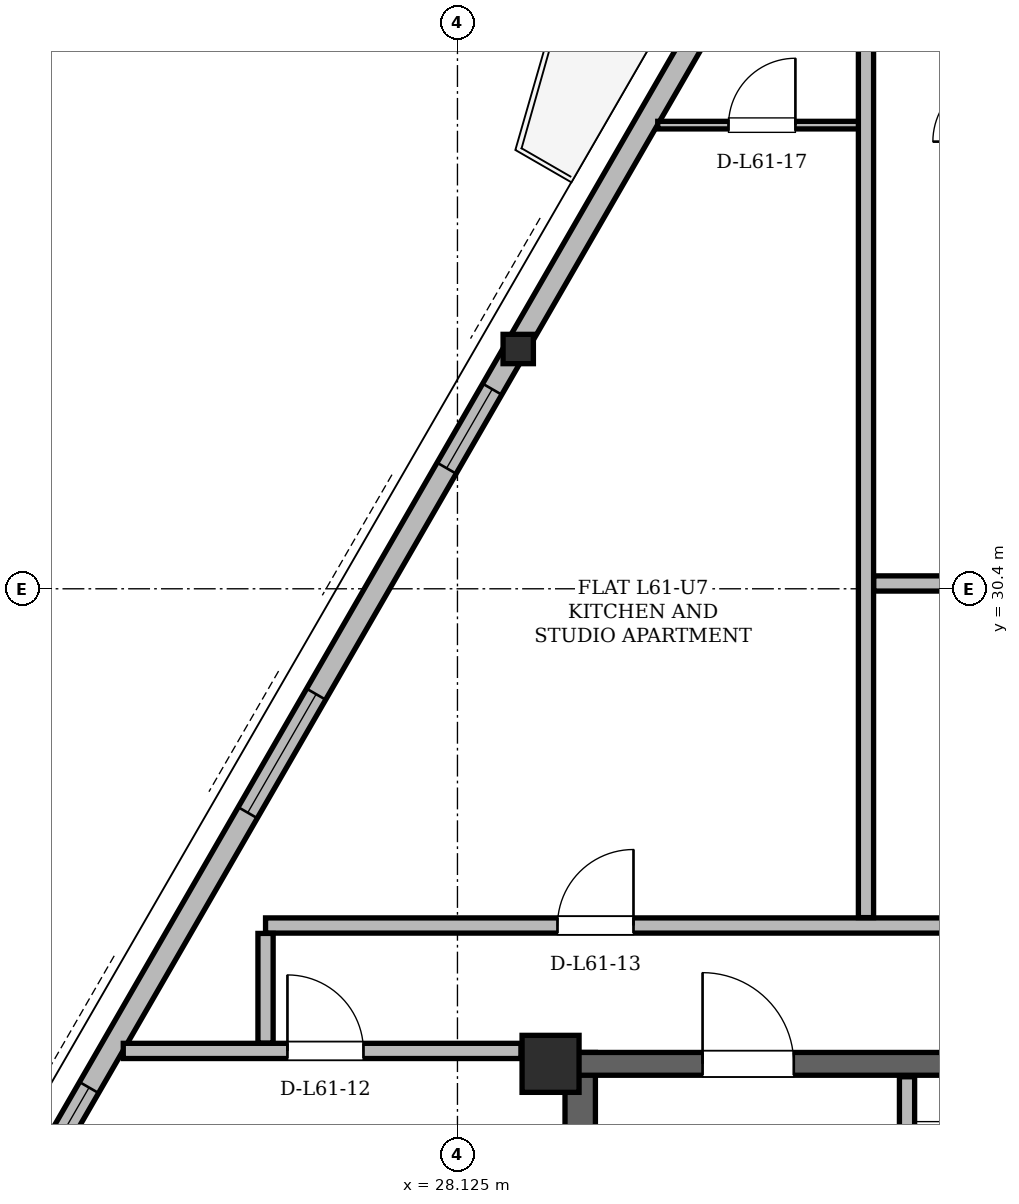
"""IFC4 building model, lengths in metres.
Left out: names, types, materials, properties, quantities, classifications, styles, units other than length and angle.
Written with IfcOpenShell. Run it as: python <this file> out.ifc"""

import sys

from ifc_helpers import new_model, si_unit, direction, frame, frame_2d, origin, origin_2d, place, context, subcontext, project, spatial, rectangle, hollow_rectangle, i_section, extrude, element, fill, save


model = new_model("IFC4")
c1 = context("Model", 3, precision=1e-05, world=origin(), true_north=direction((0.0, 1.0)))
c2 = subcontext(c1, "Body", "Model", "MODEL_VIEW")
j1 = project(units=[si_unit("LENGTHUNIT", "METRE"), si_unit("PLANEANGLEUNIT", "RADIAN")], contexts=[c1])
p1 = place(None, origin())
s1 = spatial("IfcSite", under=j1, at=p1, CompositionType="ELEMENT")
p2 = place(p1, origin())
s2 = spatial("IfcBuilding", under=s1, at=p2, CompositionType="ELEMENT")
p3 = place(p2, frame((0.0, 0.0, 230.7)))
s3 = spatial("IfcBuildingStorey", under=s2, at=p3, CompositionType="ELEMENT", Elevation=230.7)
p4 = place(p3, frame((29.35, 24.15, 0.0), z_axis=(0.0, 0.0, 1.0), x_axis=(1.0, 0.0, 0.0)))
e1 = element("IfcColumn", 1, at=p4, inside=s3, PredefinedType="COLUMN", context=c2, shape_type="SweptSolid", body=[
    extrude(hollow_rectangle(XDim=0.75, YDim=0.75, WallThickness=0.06, at=origin_2d()), origin(), (0.0, 0.0, 1.0), 3.6),
])
p5 = place(p3, frame((28.894, 33.566, 0.005), z_axis=(0.016926783589, -0.006458009803, 0.999835875585), x_axis=(0.356463384925, 0.934309293119, 0.0)))
e2 = element("IfcColumn", 2, at=p5, inside=s3, PredefinedType="COLUMN", context=c2, shape_type="SweptSolid", body=[
    extrude(i_section(OverallWidth=0.399, OverallDepth=0.386, WebThickness=0.021, FlangeThickness=0.033, at=origin_2d()), origin(), (0.0, 0.0, 1.0), 3.591),
])
p6 = place(p3, frame((29.74, 11.0, 0.0), z_axis=(0.0, 0.0, 1.0), x_axis=(0.0, 1.0, 0.0)))
e3 = element("IfcWall", 3, at=p6, inside=s3, PredefinedType="SHEAR", context=c2, shape_type="SweptSolid", body=[
    extrude(rectangle(XDim=13.3, YDim=0.4, at=frame_2d((6.65, 0.0))), origin(), (0.0, 0.0, 1.0), 3.38),
])
p7 = place(p3, frame((29.65, 24.15, 0.0), z_axis=(0.0, 0.0, 1.0), x_axis=(1.0, 0.0, 0.0)))
e4 = element("IfcWall", 4, at=p7, inside=s3, PredefinedType="SHEAR", context=c2, shape_type="SweptSolid", body=[
    extrude(rectangle(XDim=15.7, YDim=0.3, at=frame_2d((7.85, 0.0))), origin(), (0.0, 0.0, 1.0), 3.38),
])
p8 = place(p7, frame((1.7, 0.0, 0.0)))
e5 = element("IfcOpeningElement", 5, at=p8, cuts=e4, PredefinedType="OPENING", context=c2, shape_type="SweptSolid", body=[
    extrude(rectangle(XDim=1.2, YDim=2.2, at=frame_2d((0.6, 1.1))), frame((0.0, 0.15, 0.0), z_axis=(0.0, -1.0, 0.0), x_axis=(1.0, 0.0, 0.0)), (0.0, 0.0, 1.0), 0.3),
])
p9 = place(p7, frame((12.8, 0.0, 0.0)))
e6 = element("IfcOpeningElement", 6, at=p9, cuts=e4, PredefinedType="OPENING", context=c2, shape_type="SweptSolid", body=[
    extrude(rectangle(XDim=1.2, YDim=2.2, at=frame_2d((0.6, 1.1))), frame((0.0, 0.15, 0.0), z_axis=(0.0, -1.0, 0.0), x_axis=(1.0, 0.0, 0.0)), (0.0, 0.0, 1.0), 0.3),
])
p10 = place(p7, frame((6.55, 0.0, 0.0)))
e7 = element("IfcOpeningElement", 7, at=p10, cuts=e4, PredefinedType="OPENING", context=c2, shape_type="SweptSolid", body=[
    extrude(rectangle(XDim=0.9, YDim=2.05, at=frame_2d((0.45, 1.025))), frame((0.0, 0.15, 0.0), z_axis=(0.0, -1.0, 0.0), x_axis=(1.0, 0.0, 0.0)), (0.0, 0.0, 1.0), 0.3),
])
p11 = place(p7, frame((8.45, 0.0, 0.0)))
e8 = element("IfcOpeningElement", 8, at=p11, cuts=e4, PredefinedType="OPENING", context=c2, shape_type="SweptSolid", body=[
    extrude(rectangle(XDim=0.9, YDim=2.05, at=frame_2d((0.45, 1.025))), frame((0.0, 0.15, 0.0), z_axis=(0.0, -1.0, 0.0), x_axis=(1.0, 0.0, 0.0)), (0.0, 0.0, 1.0), 0.3),
])
p12 = place(p3, frame((34.414, 43.126, 0.0), z_axis=(0.0, 0.0, 1.0), x_axis=(-0.50000331183, -0.86602349169, 0.0)))
e9 = element("IfcWall", 9, at=p12, inside=s3, PredefinedType="SOLIDWALL", context=c2, shape_type="SweptSolid", body=[
    extrude(rectangle(XDim=36.795, YDim=0.29, at=frame_2d((18.397, 0.0))), origin(), (0.0, 0.0, 1.0), 2.677),
])
p13 = place(p12, frame((3.529, 0.0, 0.0)))
e10 = element("IfcOpeningElement", 10, at=p13, cuts=e9, PredefinedType="OPENING", context=c2, shape_type="SweptSolid", body=[
    extrude(rectangle(XDim=1.3, YDim=2.2, at=frame_2d((0.65, 1.1))), frame((0.0, 0.145, 0.0), z_axis=(0.0, -1.0, 0.0), x_axis=(1.0, 0.0, 0.0)), (0.0, 0.0, 1.0), 0.29),
])
p14 = place(p12, frame((27.261, 0.0, 0.0)))
e11 = element("IfcOpeningElement", 11, at=p14, cuts=e9, PredefinedType="OPENING", context=c2, shape_type="SweptSolid", body=[
    extrude(rectangle(XDim=1.5, YDim=2.2, at=frame_2d((0.75, 1.1))), frame((0.0, 0.145, 0.0), z_axis=(0.0, -1.0, 0.0), x_axis=(1.0, 0.0, 0.0)), (0.0, 0.0, 1.0), 0.29),
])
p15 = place(p12, frame((22.271, 0.0, 0.85)))
e12 = element("IfcOpeningElement", 12, at=p15, cuts=e9, PredefinedType="OPENING", context=c2, shape_type="SweptSolid", body=[
    extrude(rectangle(XDim=2.4, YDim=1.717, at=frame_2d((1.2, 0.858))), frame((0.0, 0.145, 0.0), z_axis=(0.0, -1.0, 0.0), x_axis=(1.0, 0.0, 0.0)), (0.0, 0.0, 1.0), 0.29),
])
p16 = place(p12, frame((33.406, 0.0, 0.85)))
e13 = element("IfcOpeningElement", 13, at=p16, cuts=e9, PredefinedType="OPENING", context=c2, shape_type="SweptSolid", body=[
    extrude(rectangle(XDim=2.2, YDim=1.717, at=frame_2d((1.1, 0.858))), frame((0.0, 0.145, 0.0), z_axis=(0.0, -1.0, 0.0), x_axis=(1.0, 0.0, 0.0)), (0.0, 0.0, 1.0), 0.29),
])
p17 = place(p12, frame((11.662, 0.0, 0.85)))
e14 = element("IfcOpeningElement", 14, at=p17, cuts=e9, PredefinedType="OPENING", context=c2, shape_type="SweptSolid", body=[
    extrude(rectangle(XDim=1.2, YDim=1.48, at=frame_2d((0.6, 0.74))), frame((0.0, 0.145, 0.0), z_axis=(0.0, -1.0, 0.0), x_axis=(1.0, 0.0, 0.0)), (0.0, 0.0, 1.0), 0.29),
])
p18 = place(p12, frame((16.295, 0.0, 0.85)))
e15 = element("IfcOpeningElement", 15, at=p18, cuts=e9, PredefinedType="OPENING", context=c2, shape_type="SweptSolid", body=[
    extrude(rectangle(XDim=1.8, YDim=1.717, at=frame_2d((0.9, 0.858))), frame((0.0, 0.145, 0.0), z_axis=(0.0, -1.0, 0.0), x_axis=(1.0, 0.0, 0.0)), (0.0, 0.0, 1.0), 0.29),
])
p19 = place(p3, frame((34.04, 19.48, 0.0), z_axis=(0.0, 0.0, 1.0), x_axis=(0.0, 1.0, 0.0)))
e16 = element("IfcWall", 16, at=p19, inside=s3, PredefinedType="PARTITIONING", context=c2, shape_type="SweptSolid", body=[
    extrude(rectangle(XDim=4.5, YDim=0.2, at=frame_2d((2.25, 0.0))), origin(), (0.0, 0.0, 1.0), 3.38),
])
p20 = place(p19, frame((2.12, 0.0, 0.0)))
e17 = element("IfcOpeningElement", 17, at=p20, cuts=e16, PredefinedType="OPENING", context=c2, shape_type="SweptSolid", body=[
    extrude(rectangle(XDim=1.1, YDim=2.2, at=frame_2d((0.55, 1.1))), frame((0.0, 0.1, 0.0), z_axis=(0.0, -1.0, 0.0), x_axis=(1.0, 0.0, 0.0)), (0.0, 0.0, 1.0), 0.2),
])
p21 = place(p3, frame((23.728, 24.32, 0.0), z_axis=(0.0, 0.0, 1.0), x_axis=(1.0, 0.0, 0.0)))
e18 = element("IfcWall", 18, at=p21, inside=s3, PredefinedType="PARTITIONING", context=c2, shape_type="SweptSolid", body=[
    extrude(rectangle(XDim=5.232, YDim=0.2, at=frame_2d((2.616, 0.0))), origin(), (0.0, 0.0, 1.0), 3.38),
])
p22 = place(p21, frame((2.16, 0.0, 0.0)))
e19 = element("IfcOpeningElement", 19, at=p22, cuts=e18, PredefinedType="OPENING", context=c2, shape_type="SweptSolid", body=[
    extrude(rectangle(XDim=1.0, YDim=2.18, at=frame_2d((0.5, 1.09))), frame((0.0, 0.1, 0.0), z_axis=(0.0, -1.0, 0.0), x_axis=(1.0, 0.0, 0.0)), (0.0, 0.0, 1.0), 0.2),
])
p23 = place(p3, frame((25.6, 25.97, 0.0), z_axis=(0.0, 0.0, 1.0), x_axis=(1.0, 0.0, 0.0)))
e20 = element("IfcWall", 20, at=p23, inside=s3, PredefinedType="PARTITIONING", context=c2, shape_type="SweptSolid", body=[
    extrude(rectangle(XDim=21.85, YDim=0.2, at=frame_2d((10.925, 0.0))), origin(), (0.0, 0.0, 1.0), 2.913),
])
p24 = place(p23, frame((3.841, 0.0, 0.0)))
e21 = element("IfcOpeningElement", 21, at=p24, cuts=e20, PredefinedType="OPENING", context=c2, shape_type="SweptSolid", body=[
    extrude(rectangle(XDim=1.0, YDim=2.18, at=frame_2d((0.5, 1.09))), frame((0.0, 0.1, 0.0), z_axis=(0.0, -1.0, 0.0), x_axis=(1.0, 0.0, 0.0)), (0.0, 0.0, 1.0), 0.2),
])
p25 = place(p23, frame((9.75, 0.0, 0.0)))
e22 = element("IfcOpeningElement", 22, at=p25, cuts=e20, PredefinedType="OPENING", context=c2, shape_type="SweptSolid", body=[
    extrude(rectangle(XDim=1.3, YDim=2.2, at=frame_2d((0.65, 1.1))), frame((0.0, 0.1, 0.0), z_axis=(0.0, -1.0, 0.0), x_axis=(1.0, 0.0, 0.0)), (0.0, 0.0, 1.0), 0.2),
])
p26 = place(p23, frame((13.777, 0.0, 0.0)))
e23 = element("IfcOpeningElement", 23, at=p26, cuts=e20, PredefinedType="OPENING", context=c2, shape_type="SweptSolid", body=[
    extrude(rectangle(XDim=1.0, YDim=2.18, at=frame_2d((0.5, 1.09))), frame((0.0, 0.1, 0.0), z_axis=(0.0, -1.0, 0.0), x_axis=(1.0, 0.0, 0.0)), (0.0, 0.0, 1.0), 0.2),
])
p27 = place(p23, frame((19.016, 0.0, 0.0)))
e24 = element("IfcOpeningElement", 24, at=p27, cuts=e20, PredefinedType="OPENING", context=c2, shape_type="SweptSolid", body=[
    extrude(rectangle(XDim=1.0, YDim=2.18, at=frame_2d((0.5, 1.09))), frame((0.0, 0.1, 0.0), z_axis=(0.0, -1.0, 0.0), x_axis=(1.0, 0.0, 0.0)), (0.0, 0.0, 1.0), 0.2),
])
p28 = place(p3, frame((33.6, 30.47, 0.0), z_axis=(0.0, 0.0, 1.0), x_axis=(1.0, 0.0, 0.0)))
e25 = element("IfcWall", 25, at=p28, inside=s3, PredefinedType="PARTITIONING", context=c2, shape_type="SweptSolid", body=[
    extrude(rectangle(XDim=4.8, YDim=0.2, at=frame_2d((2.4, 0.0))), origin(), (0.0, 0.0, 1.0), 3.38),
])
p29 = place(p3, frame((30.76, 36.5, 0.0), z_axis=(0.0, 0.0, 1.0), x_axis=(1.0, 0.0, 0.0)))
e26 = element("IfcWall", 26, at=p29, inside=s3, PredefinedType="PARTITIONING", context=c2, shape_type="SweptSolid", body=[
    extrude(rectangle(XDim=2.822, YDim=0.1, at=frame_2d((1.411, 0.0))), origin(), (0.0, 0.0, 1.0), 3.38),
])
p30 = place(p29, frame((0.931, 0.0, 0.0)))
e27 = element("IfcOpeningElement", 27, at=p30, cuts=e26, PredefinedType="OPENING", context=c2, shape_type="SweptSolid", body=[
    extrude(rectangle(XDim=0.88, YDim=2.08, at=frame_2d((0.44, 1.04))), frame((0.0, 0.05, 0.0), z_axis=(0.0, -1.0, 0.0), x_axis=(1.0, 0.0, 0.0)), (0.0, 0.0, 1.0), 0.1),
])
p31 = place(p3, frame((25.6, 24.424, 0.0), z_axis=(0.0, 0.0, 1.0), x_axis=(0.0, 1.0, 0.0)))
e28 = element("IfcWall", 28, at=p31, inside=s3, PredefinedType="PARTITIONING", context=c2, shape_type="SweptSolid", body=[
    extrude(rectangle(XDim=1.442, YDim=0.2, at=frame_2d((0.721, 0.0))), origin(), (0.0, 0.0, 1.0), 3.38),
])
p32 = place(p3, frame((33.5, 26.074, 0.0), z_axis=(0.0, 0.0, 1.0), x_axis=(0.0, 1.0, 0.0)))
e29 = element("IfcWall", 29, at=p32, inside=s3, PredefinedType="PARTITIONING", context=c2, shape_type="SweptSolid", body=[
    extrude(rectangle(XDim=15.172, YDim=0.2, at=frame_2d((7.586, 0.0))), origin(), (0.0, 0.0, 1.0), 2.913),
])
p33 = place(p15, origin())
e30 = element("IfcWindow", 30, at=p33, inside=s3, PartitioningType="SINGLE_PANEL", PredefinedType="WINDOW", context=c2, shape_type="SweptSolid", body=[
    extrude(rectangle(XDim=2.4, YDim=1.717, at=frame_2d((1.2, 0.858))), frame((0.0, 0.03, 0.0), z_axis=(0.0, -1.0, 0.0), x_axis=(1.0, 0.0, 0.0)), (0.0, 0.0, 1.0), 0.06),
])
fill(e12, e30)
p34 = place(p17, origin())
e31 = element("IfcWindow", 31, at=p34, inside=s3, PartitioningType="SINGLE_PANEL", PredefinedType="WINDOW", context=c2, shape_type="SweptSolid", body=[
    extrude(rectangle(XDim=1.2, YDim=1.48, at=frame_2d((0.6, 0.74))), frame((0.0, 0.03, 0.0), z_axis=(0.0, -1.0, 0.0), x_axis=(1.0, 0.0, 0.0)), (0.0, 0.0, 1.0), 0.06),
])
fill(e14, e31)
p35 = place(p18, origin())
e32 = element("IfcWindow", 32, at=p35, inside=s3, PartitioningType="SINGLE_PANEL", PredefinedType="WINDOW", context=c2, shape_type="SweptSolid", body=[
    extrude(rectangle(XDim=1.8, YDim=1.717, at=frame_2d((0.9, 0.858))), frame((0.0, 0.03, 0.0), z_axis=(0.0, -1.0, 0.0), x_axis=(1.0, 0.0, 0.0)), (0.0, 0.0, 1.0), 0.06),
])
fill(e15, e32)
p36 = place(p8, origin())
e33 = element("IfcDoor", 33, at=p36, inside=s3, OperationType="SINGLE_SWING_LEFT", PredefinedType="DOOR", context=c2, shape_type="SweptSolid", body=[
    extrude(rectangle(XDim=1.2, YDim=2.2, at=frame_2d((0.6, 1.1))), frame((0.0, 0.025, 0.0), z_axis=(0.0, -1.0, 0.0), x_axis=(1.0, 0.0, 0.0)), (0.0, 0.0, 1.0), 0.05),
])
fill(e5, e33)
p37 = place(p22, origin())
e34 = element("IfcDoor", 34, at=p37, inside=s3, OperationType="SINGLE_SWING_LEFT", PredefinedType="DOOR", context=c2, shape_type="SweptSolid", body=[
    extrude(rectangle(XDim=1.0, YDim=2.18, at=frame_2d((0.5, 1.09))), frame((0.0, 0.025, 0.0), z_axis=(0.0, -1.0, 0.0), x_axis=(1.0, 0.0, 0.0)), (0.0, 0.0, 1.0), 0.05),
])
fill(e19, e34)
p38 = place(p24, origin())
e35 = element("IfcDoor", 35, at=p38, inside=s3, OperationType="SINGLE_SWING_RIGHT", PredefinedType="DOOR", context=c2, shape_type="SweptSolid", body=[
    extrude(rectangle(XDim=1.0, YDim=2.18, at=frame_2d((0.5, 1.09))), frame((0.0, 0.025, 0.0), z_axis=(0.0, -1.0, 0.0), x_axis=(1.0, 0.0, 0.0)), (0.0, 0.0, 1.0), 0.05),
])
fill(e21, e35)
p39 = place(p30, origin())
e36 = element("IfcDoor", 36, at=p39, inside=s3, OperationType="SINGLE_SWING_RIGHT", PredefinedType="DOOR", context=c2, shape_type="SweptSolid", body=[
    extrude(rectangle(XDim=0.88, YDim=2.08, at=frame_2d((0.44, 1.04))), frame((0.0, 0.025, 0.0), z_axis=(0.0, -1.0, 0.0), x_axis=(1.0, 0.0, 0.0)), (0.0, 0.0, 1.0), 0.05),
])
fill(e27, e36)
save(model, sys.argv[1])
